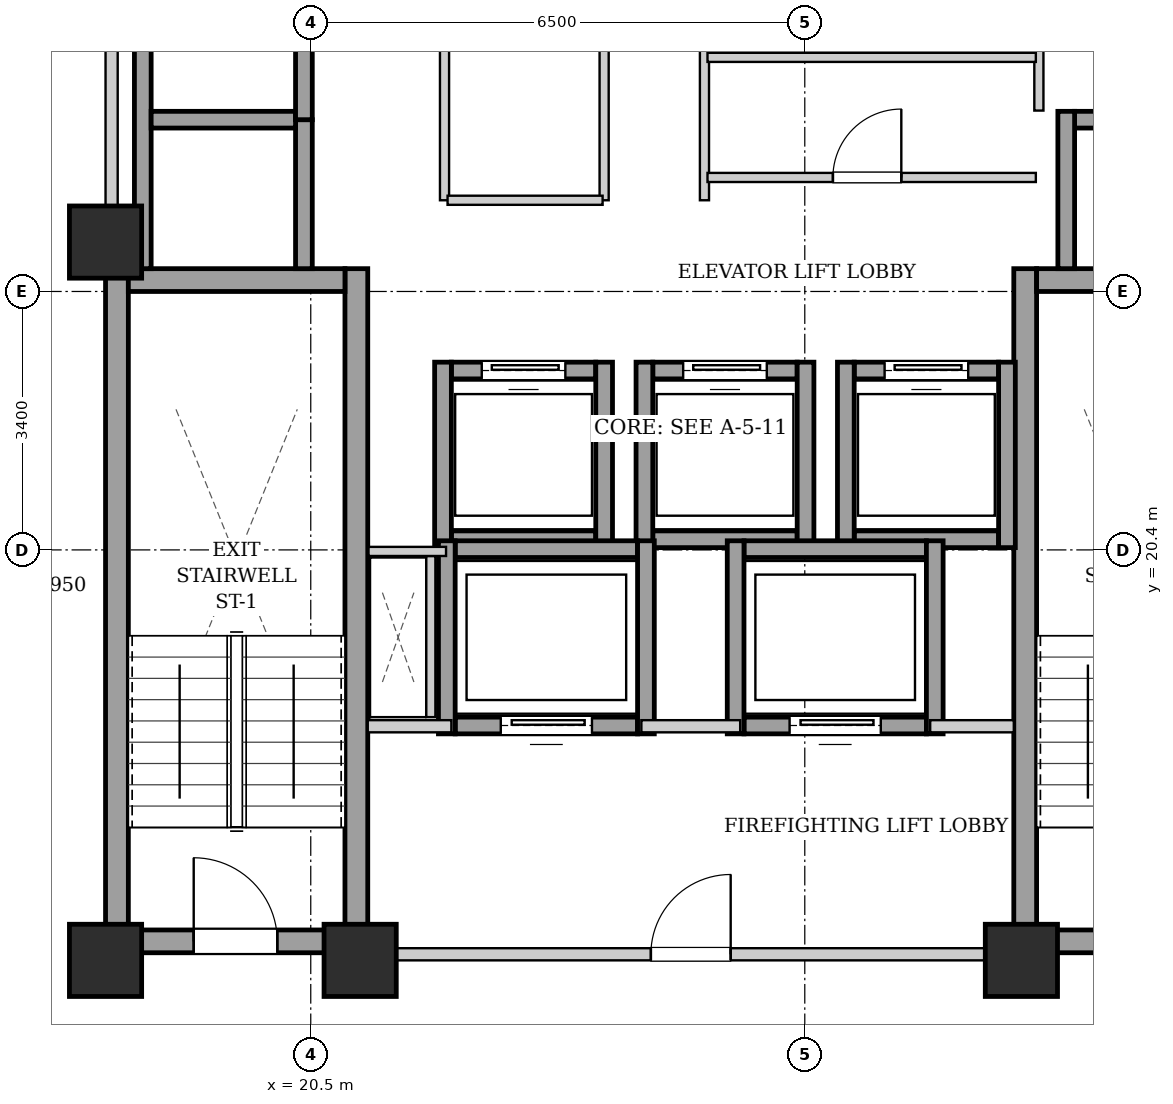
"""IFC4 building model, lengths in metres.
Left out: names, types, materials, properties, quantities, classifications, styles, units other than length and angle.
Written with IfcOpenShell. Run it as: python <this file> out.ifc"""

import sys

from ifc_helpers import new_model, si_unit, direction, frame, frame_2d, origin, origin_2d, place, context, subcontext, project, spatial, rectangle, extrude, element, fill, save


model = new_model("IFC4")
c1 = context("Model", 3, precision=1e-05, world=origin(), true_north=direction((0.0, 1.0)))
c2 = subcontext(c1, "Body", "Model", "MODEL_VIEW")
j1 = project(units=[si_unit("LENGTHUNIT", "METRE"), si_unit("PLANEANGLEUNIT", "RADIAN")], contexts=[c1])
p1 = place(None, origin())
s1 = spatial("IfcSite", under=j1, at=p1, CompositionType="ELEMENT")
p2 = place(p1, origin())
s2 = spatial("IfcBuilding", under=s1, at=p2, CompositionType="ELEMENT")
p3 = place(p2, frame((0.0, 0.0, 150.4)))
s3 = spatial("IfcBuildingStorey", under=s2, at=p3, CompositionType="ELEMENT", Elevation=150.4)
for number, where, z_axis, x_axis in (
    (1, (17.8, 15.0, 0.0), (0.0, 0.0, 1.0), (1.0, 0.0, 0.0)),
    (2, (21.15, 15.0, 0.0), (0.0, 0.0, 1.0), (1.0, 0.0, 0.0)),
    (3, (29.85, 15.0, 0.0), (0.0, 0.0, 1.0), (1.0, 0.0, 0.0)),
    (4, (17.8, 24.45, 0.0), (0.0, 0.0, 1.0), (1.0, 0.0, 0.0)),
):
    element("IfcColumn", number, at=place(p3, frame(where, z_axis=z_axis, x_axis=x_axis)), inside=s3, PredefinedType="COLUMN", context=c2, shape_type="SweptSolid", body=[
        extrude(rectangle(XDim=0.95, YDim=0.95, at=origin_2d()), origin(), (0.0, 0.0, 1.0), 3.25),
    ])
for number, where, z_axis, x_axis in (
    (5, (17.95, 15.1, 0.0), (0.0, 0.0, 1.0), (0.0, 1.0, 0.0)),
    (6, (21.1, 15.1, 0.0), (0.0, 0.0, 1.0), (0.0, 1.0, 0.0)),
):
    element("IfcWall", number, at=place(p3, frame(where, z_axis=z_axis, x_axis=x_axis)), inside=s3, PredefinedType="SHEAR", context=c2, shape_type="SweptSolid", body=[
        extrude(rectangle(XDim=9.0, YDim=0.3, at=frame_2d((4.5, 0.0))), origin(), (0.0, 0.0, 1.0), 2.99),
    ])
p4 = place(p3, frame((18.1, 23.95, 0.0), z_axis=(0.0, 0.0, 1.0), x_axis=(1.0, 0.0, 0.0)))
e7 = element("IfcWall", 7, at=p4, inside=s3, PredefinedType="SHEAR", context=c2, shape_type="SweptSolid", body=[
    extrude(rectangle(XDim=2.85, YDim=0.3, at=frame_2d((1.425, 0.0))), origin(), (0.0, 0.0, 1.0), 2.99),
])
p5 = place(p3, frame((18.1, 15.25, 0.0), z_axis=(0.0, 0.0, 1.0), x_axis=(1.0, 0.0, 0.0)))
e8 = element("IfcWall", 8, at=p5, inside=s3, PredefinedType="SHEAR", context=c2, shape_type="SweptSolid", body=[
    extrude(rectangle(XDim=2.85, YDim=0.3, at=frame_2d((1.425, 0.0))), origin(), (0.0, 0.0, 1.0), 2.99),
])
p6 = place(p5, frame((0.86, 0.0, 0.0)))
e9 = element("IfcOpeningElement", 9, at=p6, cuts=e8, PredefinedType="OPENING", context=c2, shape_type="SweptSolid", body=[
    extrude(rectangle(XDim=1.1, YDim=2.05, at=frame_2d((0.55, 1.025))), frame((0.0, 0.16, 0.0), z_axis=(0.0, -1.0, 0.0), x_axis=(1.0, 0.0, 0.0)), (0.0, 0.0, 1.0), 0.32),
])
p7 = place(p3, frame((29.9, 15.1, 0.0), z_axis=(0.0, 0.0, 1.0), x_axis=(0.0, 1.0, 0.0)))
e10 = element("IfcWall", 10, at=p7, inside=s3, PredefinedType="SHEAR", context=c2, shape_type="SweptSolid", body=[
    extrude(rectangle(XDim=9.0, YDim=0.3, at=frame_2d((4.5, 0.0))), origin(), (0.0, 0.0, 1.0), 2.99),
])
p8 = place(p3, frame((30.05, 23.95, 0.0), z_axis=(0.0, 0.0, 1.0), x_axis=(1.0, 0.0, 0.0)))
e11 = element("IfcWall", 11, at=p8, inside=s3, PredefinedType="SHEAR", context=c2, shape_type="SweptSolid", body=[
    extrude(rectangle(XDim=2.85, YDim=0.3, at=frame_2d((1.425, 0.0))), origin(), (0.0, 0.0, 1.0), 2.99),
])
p9 = place(p3, frame((30.05, 15.25, 0.0), z_axis=(0.0, 0.0, 1.0), x_axis=(1.0, 0.0, 0.0)))
e12 = element("IfcWall", 12, at=p9, inside=s3, PredefinedType="SHEAR", context=c2, shape_type="SweptSolid", body=[
    extrude(rectangle(XDim=2.85, YDim=0.3, at=frame_2d((1.425, 0.0))), origin(), (0.0, 0.0, 1.0), 2.99),
])
p10 = place(p9, frame((0.86, 0.0, 0.0)))
e13 = element("IfcOpeningElement", 13, at=p10, cuts=e12, PredefinedType="OPENING", context=c2, shape_type="SweptSolid", body=[
    extrude(rectangle(XDim=1.1, YDim=2.05, at=frame_2d((0.55, 1.025))), frame((0.0, 0.16, 0.0), z_axis=(0.0, -1.0, 0.0), x_axis=(1.0, 0.0, 0.0)), (0.0, 0.0, 1.0), 0.32),
])
p11 = place(p3, frame((22.35, 20.54, 0.0), z_axis=(0.0, 0.0, 1.0), x_axis=(1.0, 0.0, 0.0)))
e14 = element("IfcWall", 14, at=p11, inside=s3, PredefinedType="SHEAR", context=c2, shape_type="SweptSolid", body=[
    extrude(rectangle(XDim=1.9, YDim=0.22, at=frame_2d((0.95, 0.0))), origin(), (0.0, 0.0, 1.0), 2.99),
])
p12 = place(p3, frame((22.35, 22.76, 0.0), z_axis=(0.0, 0.0, 1.0), x_axis=(1.0, 0.0, 0.0)))
e15 = element("IfcWall", 15, at=p12, inside=s3, PredefinedType="SHEAR", context=c2, shape_type="SweptSolid", body=[
    extrude(rectangle(XDim=1.9, YDim=0.22, at=frame_2d((0.95, 0.0))), origin(), (0.0, 0.0, 1.0), 2.99),
])
p13 = place(p12, frame((0.4, 0.0, 0.0)))
e16 = element("IfcOpeningElement", 16, at=p13, cuts=e15, PredefinedType="OPENING", context=c2, shape_type="SweptSolid", body=[
    extrude(rectangle(XDim=1.1, YDim=2.15, at=frame_2d((0.55, 1.075))), frame((0.0, 0.12, 0.0), z_axis=(0.0, -1.0, 0.0), x_axis=(1.0, 0.0, 0.0)), (0.0, 0.0, 1.0), 0.24),
])
for number, where, z_axis, x_axis in (
    (17, (22.24, 20.43, 0.0), (0.0, 0.0, 1.0), (0.0, 1.0, 0.0)),
    (18, (24.36, 20.43, 0.0), (0.0, 0.0, 1.0), (0.0, 1.0, 0.0)),
):
    element("IfcWall", number, at=place(p3, frame(where, z_axis=z_axis, x_axis=x_axis)), inside=s3, PredefinedType="SHEAR", context=c2, shape_type="SweptSolid", body=[
        extrude(rectangle(XDim=2.44, YDim=0.22, at=frame_2d((1.22, 0.0))), origin(), (0.0, 0.0, 1.0), 2.99),
    ])
p14 = place(p3, frame((25.0, 20.54, 0.0), z_axis=(0.0, 0.0, 1.0), x_axis=(1.0, 0.0, 0.0)))
e19 = element("IfcWall", 19, at=p14, inside=s3, PredefinedType="SHEAR", context=c2, shape_type="SweptSolid", body=[
    extrude(rectangle(XDim=1.9, YDim=0.22, at=frame_2d((0.95, 0.0))), origin(), (0.0, 0.0, 1.0), 2.99),
])
p15 = place(p3, frame((25.0, 22.76, 0.0), z_axis=(0.0, 0.0, 1.0), x_axis=(1.0, 0.0, 0.0)))
e20 = element("IfcWall", 20, at=p15, inside=s3, PredefinedType="SHEAR", context=c2, shape_type="SweptSolid", body=[
    extrude(rectangle(XDim=1.9, YDim=0.22, at=frame_2d((0.95, 0.0))), origin(), (0.0, 0.0, 1.0), 2.99),
])
p16 = place(p15, frame((0.4, 0.0, 0.0)))
e21 = element("IfcOpeningElement", 21, at=p16, cuts=e20, PredefinedType="OPENING", context=c2, shape_type="SweptSolid", body=[
    extrude(rectangle(XDim=1.1, YDim=2.15, at=frame_2d((0.55, 1.075))), frame((0.0, 0.12, 0.0), z_axis=(0.0, -1.0, 0.0), x_axis=(1.0, 0.0, 0.0)), (0.0, 0.0, 1.0), 0.24),
])
for number, where, z_axis, x_axis in (
    (22, (24.89, 20.43, 0.0), (0.0, 0.0, 1.0), (0.0, 1.0, 0.0)),
    (23, (27.01, 20.43, 0.0), (0.0, 0.0, 1.0), (0.0, 1.0, 0.0)),
):
    element("IfcWall", number, at=place(p3, frame(where, z_axis=z_axis, x_axis=x_axis)), inside=s3, PredefinedType="SHEAR", context=c2, shape_type="SweptSolid", body=[
        extrude(rectangle(XDim=2.44, YDim=0.22, at=frame_2d((1.22, 0.0))), origin(), (0.0, 0.0, 1.0), 2.99),
    ])
p17 = place(p3, frame((27.65, 20.54, 0.0), z_axis=(0.0, 0.0, 1.0), x_axis=(1.0, 0.0, 0.0)))
e24 = element("IfcWall", 24, at=p17, inside=s3, PredefinedType="SHEAR", context=c2, shape_type="SweptSolid", body=[
    extrude(rectangle(XDim=1.9, YDim=0.22, at=frame_2d((0.95, 0.0))), origin(), (0.0, 0.0, 1.0), 2.99),
])
p18 = place(p3, frame((27.65, 22.76, 0.0), z_axis=(0.0, 0.0, 1.0), x_axis=(1.0, 0.0, 0.0)))
e25 = element("IfcWall", 25, at=p18, inside=s3, PredefinedType="SHEAR", context=c2, shape_type="SweptSolid", body=[
    extrude(rectangle(XDim=1.9, YDim=0.22, at=frame_2d((0.95, 0.0))), origin(), (0.0, 0.0, 1.0), 2.99),
])
p19 = place(p18, frame((0.4, 0.0, 0.0)))
e26 = element("IfcOpeningElement", 26, at=p19, cuts=e25, PredefinedType="OPENING", context=c2, shape_type="SweptSolid", body=[
    extrude(rectangle(XDim=1.1, YDim=2.15, at=frame_2d((0.55, 1.075))), frame((0.0, 0.12, 0.0), z_axis=(0.0, -1.0, 0.0), x_axis=(1.0, 0.0, 0.0)), (0.0, 0.0, 1.0), 0.24),
])
for number, where, z_axis, x_axis in (
    (27, (27.54, 20.43, 0.0), (0.0, 0.0, 1.0), (0.0, 1.0, 0.0)),
    (28, (29.66, 20.43, 0.0), (0.0, 0.0, 1.0), (0.0, 1.0, 0.0)),
):
    element("IfcWall", number, at=place(p3, frame(where, z_axis=z_axis, x_axis=x_axis)), inside=s3, PredefinedType="SHEAR", context=c2, shape_type="SweptSolid", body=[
        extrude(rectangle(XDim=2.44, YDim=0.22, at=frame_2d((1.22, 0.0))), origin(), (0.0, 0.0, 1.0), 2.99),
    ])
p20 = place(p3, frame((18.29, 24.1, 0.0), z_axis=(0.0, 0.0, 1.0), x_axis=(0.0, 1.0, 0.0)))
e29 = element("IfcWall", 29, at=p20, inside=s3, PredefinedType="SHEAR", context=c2, shape_type="SweptSolid", body=[
    extrude(rectangle(XDim=4.14, YDim=0.22, at=frame_2d((2.07, 0.0))), origin(), (0.0, 0.0, 1.0), 2.99),
])
p21 = place(p3, frame((20.41, 24.1, 0.0), z_axis=(0.0, 0.0, 1.0), x_axis=(0.0, 1.0, 0.0)))
e30 = element("IfcWall", 30, at=p21, inside=s3, PredefinedType="SHEAR", context=c2, shape_type="SweptSolid", body=[
    extrude(rectangle(XDim=1.96, YDim=0.22, at=frame_2d((0.98, 0.0))), origin(), (0.0, 0.0, 1.0), 2.99),
])
p22 = place(p3, frame((18.4, 26.06, 0.0), z_axis=(0.0, 0.0, 1.0), x_axis=(1.0, 0.0, 0.0)))
e31 = element("IfcWall", 31, at=p22, inside=s3, PredefinedType="SHEAR", context=c2, shape_type="SweptSolid", body=[
    extrude(rectangle(XDim=1.9, YDim=0.22, at=frame_2d((0.95, 0.0))), origin(), (0.0, 0.0, 1.0), 2.99),
])
p23 = place(p3, frame((20.41, 26.06, 0.0), z_axis=(0.0, 0.0, 1.0), x_axis=(0.0, 1.0, 0.0)))
e32 = element("IfcWall", 32, at=p23, inside=s3, PredefinedType="SHEAR", context=c2, shape_type="SweptSolid", body=[
    extrude(rectangle(XDim=2.18, YDim=0.22, at=frame_2d((1.09, 0.0))), origin(), (0.0, 0.0, 1.0), 2.99),
])
p24 = place(p3, frame((30.55, 26.06, 0.0), z_axis=(0.0, 0.0, 1.0), x_axis=(1.0, 0.0, 0.0)))
e33 = element("IfcWall", 33, at=p24, inside=s3, PredefinedType="SHEAR", context=c2, shape_type="SweptSolid", body=[
    extrude(rectangle(XDim=1.9, YDim=0.22, at=frame_2d((0.95, 0.0))), origin(), (0.0, 0.0, 1.0), 2.99),
])
p25 = place(p3, frame((30.44, 24.1, 0.0), z_axis=(0.0, 0.0, 1.0), x_axis=(0.0, 1.0, 0.0)))
e34 = element("IfcWall", 34, at=p25, inside=s3, PredefinedType="SHEAR", context=c2, shape_type="SweptSolid", body=[
    extrude(rectangle(XDim=2.07, YDim=0.22, at=frame_2d((1.035, 0.0))), origin(), (0.0, 0.0, 1.0), 2.99),
])
p26 = place(p3, frame((22.4, 18.09, 0.0), z_axis=(0.0, 0.0, 1.0), x_axis=(1.0, 0.0, 0.0)))
e35 = element("IfcWall", 35, at=p26, inside=s3, PredefinedType="SHEAR", context=c2, shape_type="SweptSolid", body=[
    extrude(rectangle(XDim=2.4, YDim=0.22, at=frame_2d((1.2, 0.0))), origin(), (0.0, 0.0, 1.0), 2.99),
])
p27 = place(p26, frame((0.6, 0.0, 0.0)))
e36 = element("IfcOpeningElement", 36, at=p27, cuts=e35, PredefinedType="OPENING", context=c2, shape_type="SweptSolid", body=[
    extrude(rectangle(XDim=1.2, YDim=2.15, at=frame_2d((0.6, 1.075))), frame((0.0, 0.12, 0.0), z_axis=(0.0, -1.0, 0.0), x_axis=(1.0, 0.0, 0.0)), (0.0, 0.0, 1.0), 0.24),
])
p28 = place(p3, frame((22.4, 20.41, 0.0), z_axis=(0.0, 0.0, 1.0), x_axis=(1.0, 0.0, 0.0)))
e37 = element("IfcWall", 37, at=p28, inside=s3, PredefinedType="SHEAR", context=c2, shape_type="SweptSolid", body=[
    extrude(rectangle(XDim=2.4, YDim=0.22, at=frame_2d((1.2, 0.0))), origin(), (0.0, 0.0, 1.0), 2.99),
])
for number, where, z_axis, x_axis in (
    (38, (22.29, 17.98, 0.0), (0.0, 0.0, 1.0), (0.0, 1.0, 0.0)),
    (39, (24.91, 17.98, 0.0), (0.0, 0.0, 1.0), (0.0, 1.0, 0.0)),
):
    element("IfcWall", number, at=place(p3, frame(where, z_axis=z_axis, x_axis=x_axis)), inside=s3, PredefinedType="SHEAR", context=c2, shape_type="SweptSolid", body=[
        extrude(rectangle(XDim=2.54, YDim=0.22, at=frame_2d((1.27, 0.0))), origin(), (0.0, 0.0, 1.0), 2.99),
    ])
p29 = place(p3, frame((26.2, 18.09, 0.0), z_axis=(0.0, 0.0, 1.0), x_axis=(1.0, 0.0, 0.0)))
e40 = element("IfcWall", 40, at=p29, inside=s3, PredefinedType="SHEAR", context=c2, shape_type="SweptSolid", body=[
    extrude(rectangle(XDim=2.4, YDim=0.22, at=frame_2d((1.2, 0.0))), origin(), (0.0, 0.0, 1.0), 2.99),
])
p30 = place(p29, frame((0.6, 0.0, 0.0)))
e41 = element("IfcOpeningElement", 41, at=p30, cuts=e40, PredefinedType="OPENING", context=c2, shape_type="SweptSolid", body=[
    extrude(rectangle(XDim=1.2, YDim=2.15, at=frame_2d((0.6, 1.075))), frame((0.0, 0.12, 0.0), z_axis=(0.0, -1.0, 0.0), x_axis=(1.0, 0.0, 0.0)), (0.0, 0.0, 1.0), 0.24),
])
p31 = place(p3, frame((26.2, 20.41, 0.0), z_axis=(0.0, 0.0, 1.0), x_axis=(1.0, 0.0, 0.0)))
e42 = element("IfcWall", 42, at=p31, inside=s3, PredefinedType="SHEAR", context=c2, shape_type="SweptSolid", body=[
    extrude(rectangle(XDim=2.4, YDim=0.22, at=frame_2d((1.2, 0.0))), origin(), (0.0, 0.0, 1.0), 2.99),
])
for number, where, z_axis, x_axis in (
    (43, (26.09, 17.98, 0.0), (0.0, 0.0, 1.0), (0.0, 1.0, 0.0)),
    (44, (28.71, 17.98, 0.0), (0.0, 0.0, 1.0), (0.0, 1.0, 0.0)),
):
    element("IfcWall", number, at=place(p3, frame(where, z_axis=z_axis, x_axis=x_axis)), inside=s3, PredefinedType="SHEAR", context=c2, shape_type="SweptSolid", body=[
        extrude(rectangle(XDim=2.54, YDim=0.22, at=frame_2d((1.27, 0.0))), origin(), (0.0, 0.0, 1.0), 2.99),
    ])
p32 = place(p3, frame((21.25, 15.08, 0.0), z_axis=(0.0, 0.0, 1.0), x_axis=(1.0, 0.0, 0.0)))
e45 = element("IfcWall", 45, at=p32, inside=s3, PredefinedType="PARTITIONING", context=c2, shape_type="SweptSolid", body=[
    extrude(rectangle(XDim=8.5, YDim=0.16, at=frame_2d((4.25, 0.0))), origin(), (0.0, 0.0, 1.0), 2.442),
])
p33 = place(p32, frame((3.725, 0.0, 0.0)))
e46 = element("IfcOpeningElement", 46, at=p33, cuts=e45, PredefinedType="OPENING", context=c2, shape_type="SweptSolid", body=[
    extrude(rectangle(XDim=1.05, YDim=2.05, at=frame_2d((0.525, 1.025))), frame((0.0, 0.09, 0.0), z_axis=(0.0, -1.0, 0.0), x_axis=(1.0, 0.0, 0.0)), (0.0, 0.0, 1.0), 0.18),
])
p34 = place(p3, frame((21.25, 18.08, 0.0), z_axis=(0.0, 0.0, 1.0), x_axis=(1.0, 0.0, 0.0)))
e47 = element("IfcWall", 47, at=p34, inside=s3, PredefinedType="PARTITIONING", context=c2, shape_type="SweptSolid", body=[
    extrude(rectangle(XDim=1.1, YDim=0.16, at=frame_2d((0.55, 0.0))), origin(), (0.0, 0.0, 1.0), 2.99),
])
p35 = place(p3, frame((24.85, 18.08, 0.0), z_axis=(0.0, 0.0, 1.0), x_axis=(1.0, 0.0, 0.0)))
e48 = element("IfcWall", 48, at=p35, inside=s3, PredefinedType="PARTITIONING", context=c2, shape_type="SweptSolid", body=[
    extrude(rectangle(XDim=1.3, YDim=0.16, at=frame_2d((0.65, 0.0))), origin(), (0.0, 0.0, 1.0), 2.99),
])
p36 = place(p3, frame((28.65, 18.08, 0.0), z_axis=(0.0, 0.0, 1.0), x_axis=(1.0, 0.0, 0.0)))
e49 = element("IfcWall", 49, at=p36, inside=s3, PredefinedType="PARTITIONING", context=c2, shape_type="SweptSolid", body=[
    extrude(rectangle(XDim=1.1, YDim=0.16, at=frame_2d((0.55, 0.0))), origin(), (0.0, 0.0, 1.0), 2.99),
])
p37 = place(p3, frame((17.88, 24.12, 0.0), z_axis=(0.0, 0.0, 1.0), x_axis=(0.0, 1.0, 0.0)))
e50 = element("IfcWall", 50, at=p37, inside=s3, PredefinedType="PARTITIONING", context=c2, shape_type="SweptSolid", body=[
    extrude(rectangle(XDim=4.76, YDim=0.16, at=frame_2d((2.38, 0.0))), origin(), (0.0, 0.0, 1.0), 2.99),
])
p38 = place(p3, frame((22.08, 18.2, 0.0), z_axis=(0.0, 0.0, 1.0), x_axis=(0.0, 1.0, 0.0)))
e51 = element("IfcWall", 51, at=p38, inside=s3, PredefinedType="PARTITIONING", context=c2, shape_type="SweptSolid", body=[
    extrude(rectangle(XDim=2.12, YDim=0.12, at=frame_2d((1.06, 0.0))), origin(), (0.0, 0.0, 1.0), 2.99),
])
p39 = place(p3, frame((22.28, 20.38, 0.0), z_axis=(0.0, 0.0, 1.0), x_axis=(-1.0, 0.0, 0.0)))
e52 = element("IfcWall", 52, at=p39, inside=s3, PredefinedType="PARTITIONING", context=c2, shape_type="SweptSolid", body=[
    extrude(rectangle(XDim=1.02, YDim=0.12, at=frame_2d((0.51, 0.0))), origin(), (0.0, 0.0, 1.0), 2.99),
])
for number, where, z_axis, x_axis in (
    (53, (24.36, 25.0, 0.0), (0.0, 0.0, 1.0), (0.0, 1.0, 0.0)),
    (54, (25.68, 25.0, 0.0), (0.0, 0.0, 1.0), (0.0, 1.0, 0.0)),
):
    element("IfcWall", number, at=place(p3, frame(where, z_axis=z_axis, x_axis=x_axis)), inside=s3, PredefinedType="PARTITIONING", context=c2, shape_type="SweptSolid", body=[
        extrude(rectangle(XDim=3.87, YDim=0.12, at=frame_2d((1.935, 0.0))), origin(), (0.0, 0.0, 1.0), 2.99),
    ])
p40 = place(p3, frame((30.08, 26.18, 0.0), z_axis=(0.0, 0.0, 1.0), x_axis=(0.0, 1.0, 0.0)))
e55 = element("IfcWall", 55, at=p40, inside=s3, PredefinedType="PARTITIONING", context=c2, shape_type="SweptSolid", body=[
    extrude(rectangle(XDim=2.68, YDim=0.12, at=frame_2d((1.34, 0.0))), origin(), (0.0, 0.0, 1.0), 2.99),
])
p41 = place(p3, frame((22.26, 25.0, 0.0), z_axis=(0.0, 0.0, 1.0), x_axis=(0.0, 1.0, 0.0)))
e56 = element("IfcWall", 56, at=p41, inside=s3, PredefinedType="PARTITIONING", context=c2, shape_type="SweptSolid", body=[
    extrude(rectangle(XDim=3.86, YDim=0.12, at=frame_2d((1.93, 0.0))), origin(), (0.0, 0.0, 1.0), 2.99),
])
p42 = place(p3, frame((22.3, 25.0, 0.0), z_axis=(0.0, 0.0, 1.0), x_axis=(1.0, 0.0, 0.0)))
e57 = element("IfcWall", 57, at=p42, inside=s3, PredefinedType="PARTITIONING", context=c2, shape_type="SweptSolid", body=[
    extrude(rectangle(XDim=2.04, YDim=0.12, at=frame_2d((1.02, 0.0))), origin(), (0.0, 0.0, 1.0), 2.99),
])
p43 = place(p3, frame((25.72, 26.88, 0.0), z_axis=(0.0, 0.0, 1.0), x_axis=(1.0, 0.0, 0.0)))
e58 = element("IfcWall", 58, at=p43, inside=s3, PredefinedType="PARTITIONING", context=c2, shape_type="SweptSolid", body=[
    extrude(rectangle(XDim=4.32, YDim=0.12, at=frame_2d((2.16, 0.0))), origin(), (0.0, 0.0, 1.0), 2.99),
])
p44 = place(p3, frame((25.72, 25.3, 0.0), z_axis=(0.0, 0.0, 1.0), x_axis=(1.0, 0.0, 0.0)))
e59 = element("IfcWall", 59, at=p44, inside=s3, PredefinedType="PARTITIONING", context=c2, shape_type="SweptSolid", body=[
    extrude(rectangle(XDim=4.32, YDim=0.12, at=frame_2d((2.16, 0.0))), origin(), (0.0, 0.0, 1.0), 2.99),
])
p45 = place(p44, frame((1.65, 0.0, 0.0)))
e60 = element("IfcOpeningElement", 60, at=p45, cuts=e59, PredefinedType="OPENING", context=c2, shape_type="SweptSolid", body=[
    extrude(rectangle(XDim=0.9, YDim=2.05, at=frame_2d((0.45, 1.025))), frame((0.0, 0.07, 0.0), z_axis=(0.0, -1.0, 0.0), x_axis=(1.0, 0.0, 0.0)), (0.0, 0.0, 1.0), 0.14),
])
p46 = place(p6, origin())
e61 = element("IfcDoor", 61, at=p46, inside=s3, OperationType="SINGLE_SWING_LEFT", PredefinedType="DOOR", context=c2, shape_type="SweptSolid", body=[
    extrude(rectangle(XDim=1.1, YDim=2.05, at=frame_2d((0.55, 1.025))), frame((0.0, 0.025, 0.0), z_axis=(0.0, -1.0, 0.0), x_axis=(1.0, 0.0, 0.0)), (0.0, 0.0, 1.0), 0.05),
])
fill(e9, e61)
p47 = place(p13, origin())
e62 = element("IfcDoor", 62, at=p47, inside=s3, OperationType="SLIDING_TO_LEFT", PredefinedType="DOOR", context=c2, shape_type="SweptSolid", body=[
    extrude(rectangle(XDim=1.1, YDim=2.15, at=frame_2d((0.55, 1.075))), frame((0.0, 0.025, 0.0), z_axis=(0.0, -1.0, 0.0), x_axis=(1.0, 0.0, 0.0)), (0.0, 0.0, 1.0), 0.05),
])
fill(e16, e62)
p48 = place(p16, origin())
e63 = element("IfcDoor", 63, at=p48, inside=s3, OperationType="SLIDING_TO_LEFT", PredefinedType="DOOR", context=c2, shape_type="SweptSolid", body=[
    extrude(rectangle(XDim=1.1, YDim=2.15, at=frame_2d((0.55, 1.075))), frame((0.0, 0.025, 0.0), z_axis=(0.0, -1.0, 0.0), x_axis=(1.0, 0.0, 0.0)), (0.0, 0.0, 1.0), 0.05),
])
fill(e21, e63)
p49 = place(p19, origin())
e64 = element("IfcDoor", 64, at=p49, inside=s3, OperationType="SLIDING_TO_LEFT", PredefinedType="DOOR", context=c2, shape_type="SweptSolid", body=[
    extrude(rectangle(XDim=1.1, YDim=2.15, at=frame_2d((0.55, 1.075))), frame((0.0, 0.025, 0.0), z_axis=(0.0, -1.0, 0.0), x_axis=(1.0, 0.0, 0.0)), (0.0, 0.0, 1.0), 0.05),
])
fill(e26, e64)
p50 = place(p27, origin())
e65 = element("IfcDoor", 65, at=p50, inside=s3, OperationType="SLIDING_TO_LEFT", PredefinedType="DOOR", context=c2, shape_type="SweptSolid", body=[
    extrude(rectangle(XDim=1.2, YDim=2.15, at=frame_2d((0.6, 1.075))), frame((0.0, 0.025, 0.0), z_axis=(0.0, -1.0, 0.0), x_axis=(1.0, 0.0, 0.0)), (0.0, 0.0, 1.0), 0.05),
])
fill(e36, e65)
p51 = place(p30, origin())
e66 = element("IfcDoor", 66, at=p51, inside=s3, OperationType="SLIDING_TO_LEFT", PredefinedType="DOOR", context=c2, shape_type="SweptSolid", body=[
    extrude(rectangle(XDim=1.2, YDim=2.15, at=frame_2d((0.6, 1.075))), frame((0.0, 0.025, 0.0), z_axis=(0.0, -1.0, 0.0), x_axis=(1.0, 0.0, 0.0)), (0.0, 0.0, 1.0), 0.05),
])
fill(e41, e66)
p52 = place(p33, origin())
e67 = element("IfcDoor", 67, at=p52, inside=s3, OperationType="SINGLE_SWING_RIGHT", PredefinedType="DOOR", context=c2, shape_type="SweptSolid", body=[
    extrude(rectangle(XDim=1.05, YDim=2.05, at=frame_2d((0.525, 1.025))), frame((0.0, 0.025, 0.0), z_axis=(0.0, -1.0, 0.0), x_axis=(1.0, 0.0, 0.0)), (0.0, 0.0, 1.0), 0.05),
])
fill(e46, e67)
p53 = place(p45, origin())
e68 = element("IfcDoor", 68, at=p53, inside=s3, OperationType="SINGLE_SWING_RIGHT", PredefinedType="DOOR", context=c2, shape_type="SweptSolid", body=[
    extrude(rectangle(XDim=0.9, YDim=2.05, at=frame_2d((0.45, 1.025))), frame((0.0, 0.025, 0.0), z_axis=(0.0, -1.0, 0.0), x_axis=(1.0, 0.0, 0.0)), (0.0, 0.0, 1.0), 0.05),
])
fill(e60, e68)
save(model, sys.argv[1])
